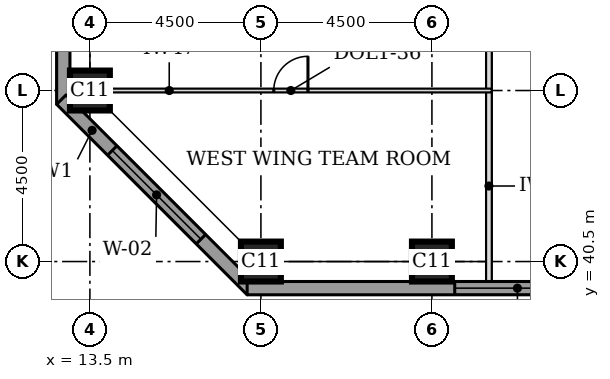
"""IFC4 building model, lengths in metres.
Left out: names, types, materials, properties, quantities, classifications, styles, units other than length and angle.
Written with IfcOpenShell. Run it as: python <this file> out.ifc"""

import sys

from ifc_helpers import new_model, si_unit, direction, frame, frame_2d, origin, origin_2d, place, context, subcontext, project, spatial, rectangle, extrude, element, fill, save


model = new_model("IFC4")
c1 = context("Model", 3, precision=1e-05, world=origin(), true_north=direction((0.0, 1.0)))
c2 = subcontext(c1, "Body", "Model", "MODEL_VIEW")
j1 = project(units=[si_unit("LENGTHUNIT", "METRE"), si_unit("PLANEANGLEUNIT", "RADIAN")], contexts=[c1])
p1 = place(None, origin())
s1 = spatial("IfcSite", under=j1, at=p1, CompositionType="ELEMENT")
p2 = place(p1, origin())
s2 = spatial("IfcBuilding", under=s1, at=p2, CompositionType="ELEMENT")
p3 = place(p2, frame((0.0, 0.0, 82.6)))
s3 = spatial("IfcBuildingStorey", under=s2, at=p3, CompositionType="ELEMENT", Elevation=82.6)
for number, where, z_axis, x_axis in (
    (1, (18.0, 40.5, 0.0), (0.0, 0.0, 1.0), (1.0, 0.0, 0.0)),
    (2, (22.5, 40.5, 0.0), (0.0, 0.0, 1.0), (1.0, 0.0, 0.0)),
    (3, (13.5, 45.0, 0.0), (0.0, 0.0, 1.0), (1.0, 0.0, 0.0)),
):
    element("IfcColumn", number, at=place(p3, frame(where, z_axis=z_axis, x_axis=x_axis)), inside=s3, PredefinedType="COLUMN", context=c2, shape_type="SweptSolid", body=[
        extrude(rectangle(XDim=1.05, YDim=1.05, at=origin_2d()), origin(), (0.0, 0.0, 1.0), 3.7),
    ])
p4 = place(p3, frame((12.8, 58.862, 0.0), z_axis=(0.0, 0.0, 1.0), x_axis=(0.0, -1.0, 0.0)))
e4 = element("IfcWall", 4, at=p4, inside=s3, PredefinedType="STANDARD", context=c2, shape_type="SweptSolid", body=[
    extrude(rectangle(XDim=14.225, YDim=0.35, at=frame_2d((7.112, 0.0))), origin(), (0.0, 0.0, 1.0), 3.525),
])
p5 = place(p4, frame((5.462, 0.0, 0.9)))
e5 = element("IfcOpeningElement", 5, at=p5, cuts=e4, PredefinedType="OPENING", context=c2, shape_type="SweptSolid", body=[
    extrude(rectangle(XDim=3.3, YDim=1.9, at=frame_2d((1.65, 0.95))), frame((0.0, 0.185, 0.0), z_axis=(0.0, -1.0, 0.0), x_axis=(1.0, 0.0, 0.0)), (0.0, 0.0, 1.0), 0.37),
])
p6 = place(p3, frame((12.749, 44.761, 0.0), z_axis=(0.0, 0.0, 1.0), x_axis=(0.707106781187, -0.707106781187, 0.0)))
e6 = element("IfcWall", 6, at=p6, inside=s3, PredefinedType="STANDARD", context=c2, shape_type="SweptSolid", body=[
    extrude(rectangle(XDim=7.089, YDim=0.35, at=frame_2d((3.544, 0.0))), origin(), (0.0, 0.0, 1.0), 3.525),
])
p7 = place(p6, frame((1.894, 0.0, 0.9)))
e7 = element("IfcOpeningElement", 7, at=p7, cuts=e6, PredefinedType="OPENING", context=c2, shape_type="SweptSolid", body=[
    extrude(rectangle(XDim=3.3, YDim=1.9, at=frame_2d((1.65, 0.95))), frame((0.0, 0.185, 0.0), z_axis=(0.0, -1.0, 0.0), x_axis=(1.0, 0.0, 0.0)), (0.0, 0.0, 1.0), 0.37),
])
p8 = place(p3, frame((17.638, 39.8, 0.0), z_axis=(0.0, 0.0, 1.0), x_axis=(1.0, 0.0, 0.0)))
e8 = element("IfcWall", 8, at=p8, inside=s3, PredefinedType="STANDARD", context=c2, shape_type="SweptSolid", body=[
    extrude(rectangle(XDim=17.837, YDim=0.35, at=frame_2d((8.919, 0.0))), origin(), (0.0, 0.0, 1.0), 3.525),
])
p9 = place(p8, frame((5.462, 0.0, 0.9)))
e9 = element("IfcOpeningElement", 9, at=p9, cuts=e8, PredefinedType="OPENING", context=c2, shape_type="SweptSolid", body=[
    extrude(rectangle(XDim=3.3, YDim=1.9, at=frame_2d((1.65, 0.95))), frame((0.0, 0.185, 0.0), z_axis=(0.0, -1.0, 0.0), x_axis=(1.0, 0.0, 0.0)), (0.0, 0.0, 1.0), 0.37),
])
p10 = place(p8, frame((14.037, 0.0, 0.9)))
e10 = element("IfcOpeningElement", 10, at=p10, cuts=e8, PredefinedType="OPENING", context=c2, shape_type="SweptSolid", body=[
    extrude(rectangle(XDim=3.3, YDim=1.9, at=frame_2d((1.65, 0.95))), frame((0.0, 0.185, 0.0), z_axis=(0.0, -1.0, 0.0), x_axis=(1.0, 0.0, 0.0)), (0.0, 0.0, 1.0), 0.37),
])
p11 = place(p3, frame((24.0, 39.975, 0.0), z_axis=(0.0, 0.0, 1.0), x_axis=(0.0, 1.0, 0.0)))
e11 = element("IfcWall", 11, at=p11, inside=s3, PredefinedType="PARTITIONING", context=c2, shape_type="SweptSolid", body=[
    extrude(rectangle(XDim=5.025, YDim=0.15, at=frame_2d((2.512, 0.0))), origin(), (0.0, 0.0, 1.0), 3.55),
])
p12 = place(p3, frame((24.0, 45.0, 0.0), z_axis=(0.0, 0.0, 1.0), x_axis=(0.0, 1.0, 0.0)))
e12 = element("IfcWall", 12, at=p12, inside=s3, PredefinedType="PARTITIONING", context=c2, shape_type="SweptSolid", body=[
    extrude(rectangle(XDim=1.5, YDim=0.15, at=frame_2d((0.75, 0.0))), origin(), (0.0, 0.0, 1.0), 3.55),
])
p13 = place(p3, frame((24.075, 45.0, 0.0), z_axis=(0.0, 0.0, 1.0), x_axis=(-1.0, 0.0, 0.0)))
e13 = element("IfcWall", 13, at=p13, inside=s3, PredefinedType="PARTITIONING", context=c2, shape_type="SweptSolid", body=[
    extrude(rectangle(XDim=10.575, YDim=0.1, at=frame_2d((5.288, 0.0))), origin(), (0.0, 0.0, 1.0), 2.55),
])
p14 = place(p13, frame((4.837, 0.0, 0.0)))
e14 = element("IfcOpeningElement", 14, at=p14, cuts=e13, PredefinedType="OPENING", context=c2, shape_type="SweptSolid", body=[
    extrude(rectangle(XDim=0.9, YDim=2.1, at=frame_2d((0.45, 1.05))), frame((0.0, 0.06, 0.0), z_axis=(0.0, -1.0, 0.0), x_axis=(1.0, 0.0, 0.0)), (0.0, 0.0, 1.0), 0.12),
])
p15 = place(p7, origin())
e15 = element("IfcWindow", 15, at=p15, inside=s3, PartitioningType="SINGLE_PANEL", PredefinedType="WINDOW", context=c2, shape_type="SweptSolid", body=[
    extrude(rectangle(XDim=3.3, YDim=1.9, at=frame_2d((1.65, 0.95))), frame((0.0, 0.085, 0.0), z_axis=(0.0, -1.0, 0.0), x_axis=(1.0, 0.0, 0.0)), (0.0, 0.0, 1.0), 0.06),
])
fill(e7, e15)
p16 = place(p9, origin())
e16 = element("IfcWindow", 16, at=p16, inside=s3, PartitioningType="SINGLE_PANEL", PredefinedType="WINDOW", context=c2, shape_type="SweptSolid", body=[
    extrude(rectangle(XDim=3.3, YDim=1.9, at=frame_2d((1.65, 0.95))), frame((0.0, 0.085, 0.0), z_axis=(0.0, -1.0, 0.0), x_axis=(1.0, 0.0, 0.0)), (0.0, 0.0, 1.0), 0.06),
])
fill(e9, e16)
p17 = place(p14, frame((0.9, 0.0, 0.0), z_axis=(0.0, 0.0, 1.0), x_axis=(-1.0, 0.0, 0.0)))
e17 = element("IfcDoor", 17, at=p17, inside=s3, OperationType="SINGLE_SWING_RIGHT", PredefinedType="DOOR", context=c2, shape_type="SweptSolid", body=[
    extrude(rectangle(XDim=0.9, YDim=2.1, at=frame_2d((0.45, 1.05))), frame((0.0, 0.025, 0.0), z_axis=(0.0, -1.0, 0.0), x_axis=(1.0, 0.0, 0.0)), (0.0, 0.0, 1.0), 0.05),
])
fill(e14, e17)
save(model, sys.argv[1])
